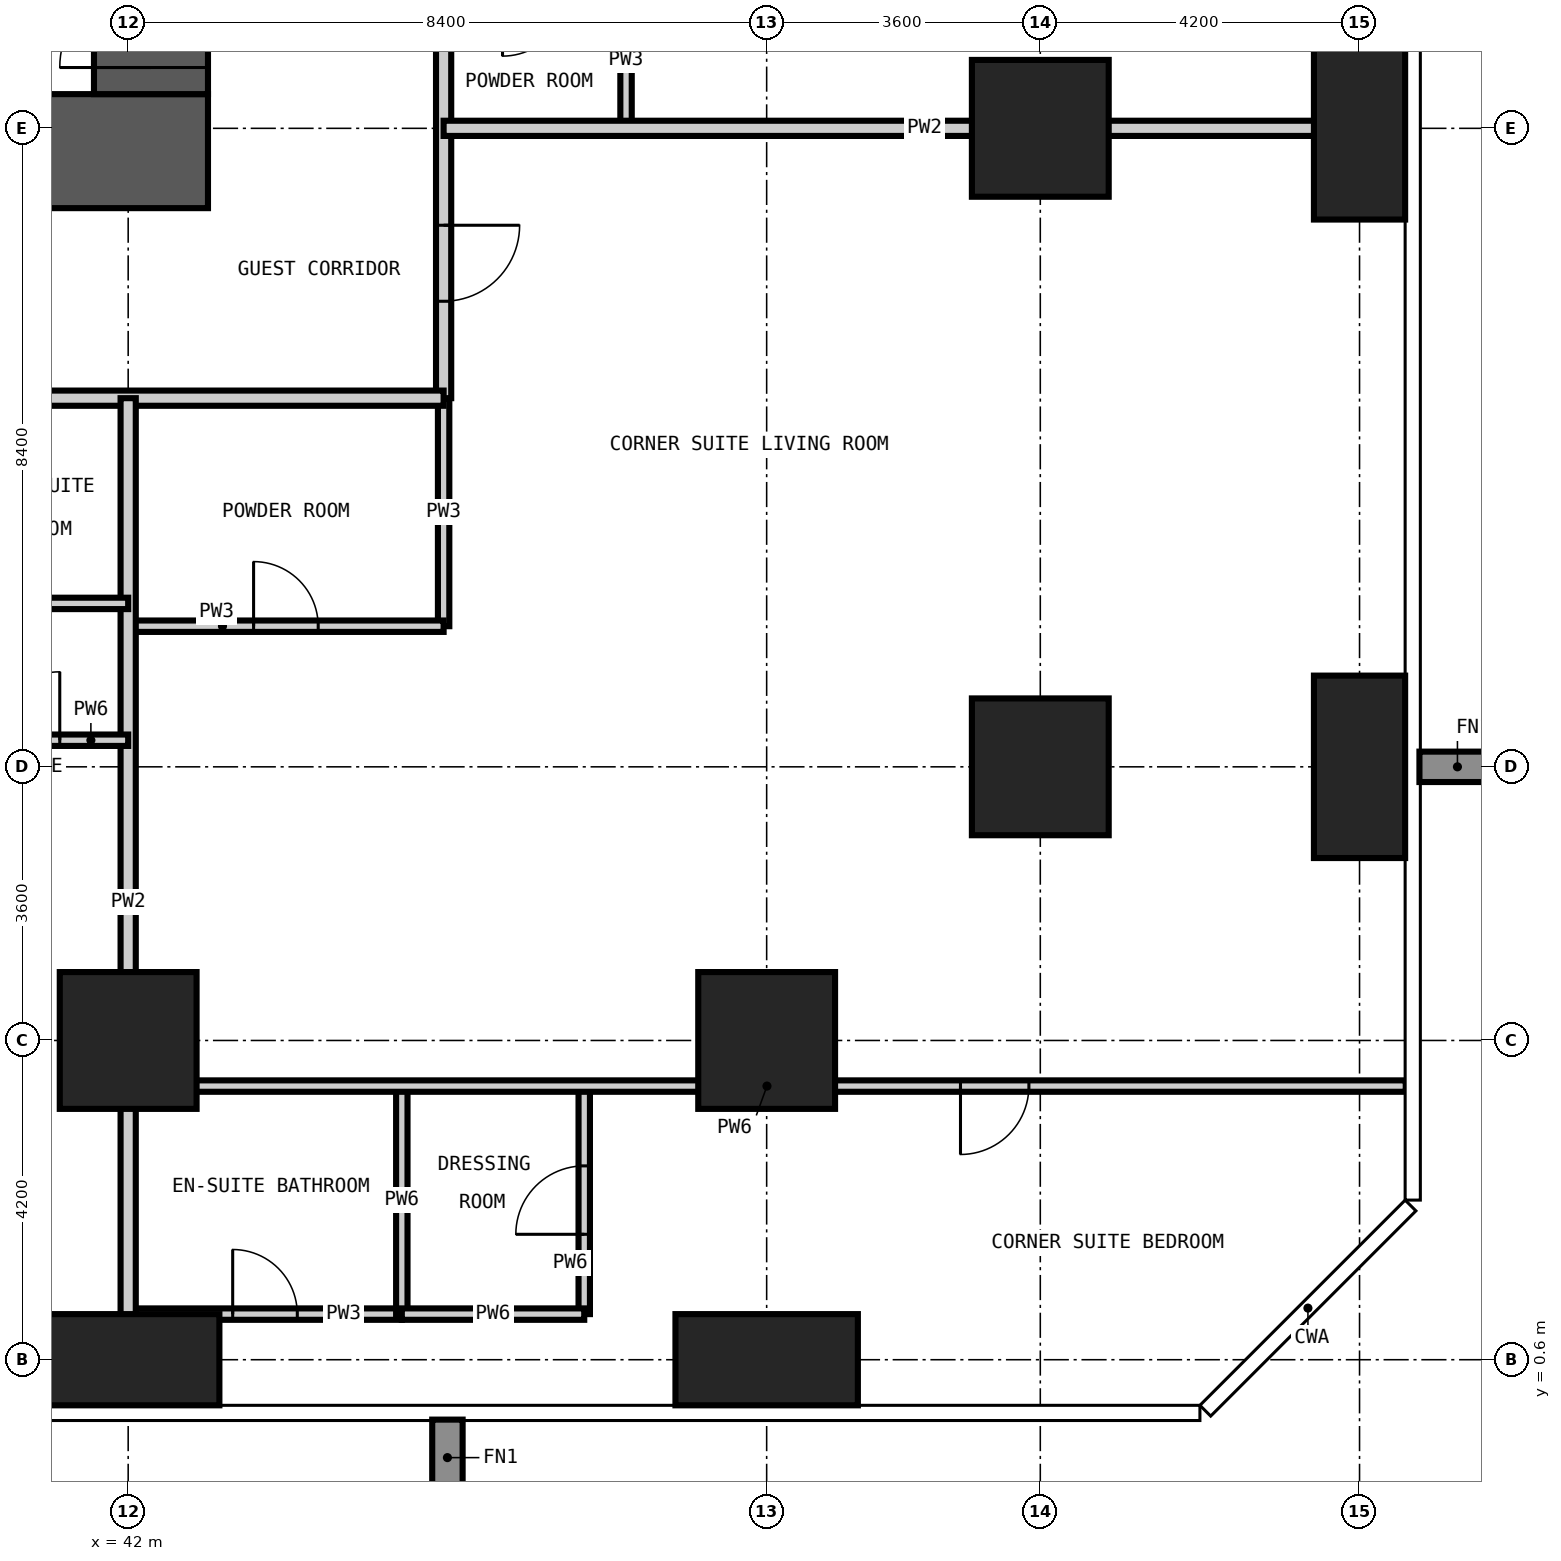
"""IFC4 building model, lengths in metres.
Left out: names, types, materials, properties, quantities, classifications, styles, units other than length and angle.
Written with IfcOpenShell. Run it as: python <this file> out.ifc"""

import sys

from ifc_helpers import new_model, si_unit, direction, frame, frame_2d, origin, origin_2d, place, context, subcontext, project, spatial, rectangle, extrude, element, fill, save


model = new_model("IFC4")
c1 = context("Model", 3, precision=1e-05, world=origin(), true_north=direction((0.0, 1.0)))
c2 = subcontext(c1, "Body", "Model", "MODEL_VIEW")
j1 = project(units=[si_unit("LENGTHUNIT", "METRE"), si_unit("PLANEANGLEUNIT", "RADIAN")], contexts=[c1])
p1 = place(None, origin())
s1 = spatial("IfcSite", under=j1, at=p1, CompositionType="ELEMENT")
p2 = place(p1, origin())
s2 = spatial("IfcBuilding", under=s1, at=p2, CompositionType="ELEMENT")
p3 = place(p2, frame((0.0, 0.0, 63.0)))
s3 = spatial("IfcBuildingStorey", under=s2, at=p3, CompositionType="ELEMENT", Elevation=63.0)
p4 = place(p3, frame((42.0, 0.6, -0.35), z_axis=(0.0, 0.0, 1.0), x_axis=(1.0, 0.0, 0.0)))
e1 = element("IfcColumn", 1, at=p4, inside=s3, PredefinedType="COLUMN", context=c2, shape_type="SweptSolid", body=[
    extrude(rectangle(XDim=2.4, YDim=1.2, at=origin_2d()), origin(), (0.0, 0.0, 1.0), 3.6),
])
p5 = place(p3, frame((42.0, 4.8, -0.35), z_axis=(0.0, 0.0, 1.0), x_axis=(1.0, 0.0, 0.0)))
e2 = element("IfcColumn", 2, at=p5, inside=s3, PredefinedType="COLUMN", context=c2, shape_type="SweptSolid", body=[
    extrude(rectangle(XDim=1.8, YDim=1.8, at=origin_2d()), origin(), (0.0, 0.0, 1.0), 3.6),
])
p6 = place(p3, frame((50.4, 0.6, -0.35), z_axis=(0.0, 0.0, 1.0), x_axis=(1.0, 0.0, 0.0)))
e3 = element("IfcColumn", 3, at=p6, inside=s3, PredefinedType="COLUMN", context=c2, shape_type="SweptSolid", body=[
    extrude(rectangle(XDim=2.4, YDim=1.2, at=origin_2d()), origin(), (0.0, 0.0, 1.0), 3.6),
])
for number, where, z_axis, x_axis in (
    (4, (50.4, 4.8, -0.35), (0.0, 0.0, 1.0), (1.0, 0.0, 0.0)),
    (5, (54.0, 8.4, -0.35), (0.0, 0.0, 1.0), (1.0, 0.0, 0.0)),
    (6, (54.0, 16.8, -0.35), (0.0, 0.0, 1.0), (1.0, 0.0, 0.0)),
):
    element("IfcColumn", number, at=place(p3, frame(where, z_axis=z_axis, x_axis=x_axis)), inside=s3, PredefinedType="COLUMN", context=c2, shape_type="SweptSolid", body=[
        extrude(rectangle(XDim=1.8, YDim=1.8, at=origin_2d()), origin(), (0.0, 0.0, 1.0), 3.6),
    ])
for number, where, z_axis, x_axis in (
    (7, (58.2, 8.4, -0.35), (0.0, 0.0, 1.0), (1.0, 0.0, 0.0)),
    (8, (58.2, 16.8, -0.35), (0.0, 0.0, 1.0), (1.0, 0.0, 0.0)),
):
    element("IfcColumn", number, at=place(p3, frame(where, z_axis=z_axis, x_axis=x_axis)), inside=s3, PredefinedType="COLUMN", context=c2, shape_type="SweptSolid", body=[
        extrude(rectangle(XDim=1.2, YDim=2.4, at=origin_2d()), origin(), (0.0, 0.0, 1.0), 3.6),
    ])
p7 = place(p3, frame((15.75, 16.5, -0.35), z_axis=(0.0, 0.0, 1.0), x_axis=(1.0, 0.0, 0.0)))
e9 = element("IfcWall", 9, at=p7, inside=s3, PredefinedType="SHEAR", context=c2, shape_type="SweptSolid", body=[
    extrude(rectangle(XDim=27.3, YDim=1.5, at=frame_2d((13.65, 0.0))), origin(), (0.0, 0.0, 1.0), 3.6),
])
p8 = place(p7, frame((13.15, 0.0, 0.35)))
e10 = element("IfcOpeningElement", 10, at=p8, cuts=e9, PredefinedType="OPENING", context=c2, shape_type="SweptSolid", body=[
    extrude(rectangle(XDim=1.0, YDim=2.1, at=frame_2d((0.5, 1.05))), frame((0.0, 0.76, 0.0), z_axis=(0.0, -1.0, 0.0), x_axis=(1.0, 0.0, 0.0)), (0.0, 0.0, 1.0), 1.52),
])
p9 = place(p7, frame((19.45, 0.0, 0.35)))
e11 = element("IfcOpeningElement", 11, at=p9, cuts=e9, PredefinedType="OPENING", context=c2, shape_type="SweptSolid", body=[
    extrude(rectangle(XDim=1.0, YDim=2.1, at=frame_2d((0.5, 1.05))), frame((0.0, 0.76, 0.0), z_axis=(0.0, -1.0, 0.0), x_axis=(1.0, 0.0, 0.0)), (0.0, 0.0, 1.0), 1.52),
])
p10 = place(p3, frame((42.3, 17.25, -0.35), z_axis=(0.0, 0.0, 1.0), x_axis=(0.0, 1.0, 0.0)))
e12 = element("IfcWall", 12, at=p10, inside=s3, PredefinedType="SHEAR", context=c2, shape_type="SweptSolid", body=[
    extrude(rectangle(XDim=24.3, YDim=1.5, at=frame_2d((12.15, 0.0))), origin(), (0.0, 0.0, 1.0), 3.6),
])
p11 = place(p10, frame((0.35, 0.0, 0.35)))
e13 = element("IfcOpeningElement", 13, at=p11, cuts=e12, PredefinedType="OPENING", context=c2, shape_type="SweptSolid", body=[
    extrude(rectangle(XDim=1.2, YDim=2.2, at=frame_2d((0.6, 1.1))), frame((0.0, 0.76, 0.0), z_axis=(0.0, -1.0, 0.0), x_axis=(1.0, 0.0, 0.0)), (0.0, 0.0, 1.0), 1.52),
])
p12 = place(p10, frame((11.65, 0.0, 0.35)))
e14 = element("IfcOpeningElement", 14, at=p12, cuts=e12, PredefinedType="OPENING", context=c2, shape_type="SweptSolid", body=[
    extrude(rectangle(XDim=1.0, YDim=2.1, at=frame_2d((0.5, 1.05))), frame((0.0, 0.76, 0.0), z_axis=(0.0, -1.0, 0.0), x_axis=(1.0, 0.0, 0.0)), (0.0, 0.0, 1.0), 1.52),
])
p13 = place(p10, frame((20.05, 0.0, 0.35)))
e15 = element("IfcOpeningElement", 15, at=p13, cuts=e12, PredefinedType="OPENING", context=c2, shape_type="SweptSolid", body=[
    extrude(rectangle(XDim=1.0, YDim=2.1, at=frame_2d((0.5, 1.05))), frame((0.0, 0.76, 0.0), z_axis=(0.0, -1.0, 0.0), x_axis=(1.0, 0.0, 0.0)), (0.0, 0.0, 1.0), 1.52),
])
p14 = place(p3, frame((46.15, 10.25, 0.0), z_axis=(0.0, 0.0, 1.0), x_axis=(0.0, 1.0, 0.0)))
e16 = element("IfcWall", 16, at=p14, inside=s3, PredefinedType="PARTITIONING", context=c2, shape_type="SweptSolid", body=[
    extrude(rectangle(XDim=3.0, YDim=0.15, at=frame_2d((1.5, 0.0))), origin(), (0.0, 0.0, 1.0), 3.25),
])
p15 = place(p3, frame((48.55, 16.8, 0.0), z_axis=(0.0, 0.0, 1.0), x_axis=(0.0, 1.0, 0.0)))
e17 = element("IfcWall", 17, at=p15, inside=s3, PredefinedType="PARTITIONING", context=c2, shape_type="SweptSolid", body=[
    extrude(rectangle(XDim=1.8, YDim=0.15, at=frame_2d((0.9, 0.0))), origin(), (0.0, 0.0, 1.0), 3.25),
])
p16 = place(p3, frame((42.0, 1.2, 0.0), z_axis=(0.0, 0.0, 1.0), x_axis=(1.0, 0.0, 0.0)))
e18 = element("IfcWall", 18, at=p16, inside=s3, PredefinedType="PARTITIONING", context=c2, shape_type="SweptSolid", body=[
    extrude(rectangle(XDim=3.6, YDim=0.15, at=frame_2d((1.8, 0.0))), origin(), (0.0, 0.0, 1.0), 3.25),
])
p17 = place(p16, frame((1.375, 0.0, 0.0)))
e19 = element("IfcOpeningElement", 19, at=p17, cuts=e18, PredefinedType="OPENING", context=c2, shape_type="SweptSolid", body=[
    extrude(rectangle(XDim=0.85, YDim=2.1, at=frame_2d((0.425, 1.05))), frame((0.0, 0.085, 0.0), z_axis=(0.0, -1.0, 0.0), x_axis=(1.0, 0.0, 0.0)), (0.0, 0.0, 1.0), 0.17),
])
p18 = place(p3, frame((42.0, 10.25, 0.0), z_axis=(0.0, 0.0, 1.0), x_axis=(1.0, 0.0, 0.0)))
e20 = element("IfcWall", 20, at=p18, inside=s3, PredefinedType="PARTITIONING", context=c2, shape_type="SweptSolid", body=[
    extrude(rectangle(XDim=4.15, YDim=0.15, at=frame_2d((2.075, 0.0))), origin(), (0.0, 0.0, 1.0), 3.25),
])
p19 = place(p18, frame((1.65, 0.0, 0.0)))
e21 = element("IfcOpeningElement", 21, at=p19, cuts=e20, PredefinedType="OPENING", context=c2, shape_type="SweptSolid", body=[
    extrude(rectangle(XDim=0.85, YDim=2.1, at=frame_2d((0.425, 1.05))), frame((0.0, 0.085, 0.0), z_axis=(0.0, -1.0, 0.0), x_axis=(1.0, 0.0, 0.0)), (0.0, 0.0, 1.0), 0.17),
])
p20 = place(p3, frame((46.15, 44.95, 0.0), z_axis=(0.0, 0.0, 1.0), x_axis=(0.0, -1.0, 0.0)))
e22 = element("IfcWall", 22, at=p20, inside=s3, PredefinedType="PARTITIONING", context=c2, shape_type="SweptSolid", body=[
    extrude(rectangle(XDim=31.7, YDim=0.2, at=frame_2d((15.85, 0.0))), origin(), (0.0, 0.0, 1.0), 3.25),
])
p21 = place(p20, frame((24.65, 0.0, 0.0)))
e23 = element("IfcOpeningElement", 23, at=p21, cuts=e22, PredefinedType="OPENING", context=c2, shape_type="SweptSolid", body=[
    extrude(rectangle(XDim=1.0, YDim=2.2, at=frame_2d((0.5, 1.1))), frame((0.0, 0.11, 0.0), z_axis=(0.0, -1.0, 0.0), x_axis=(1.0, 0.0, 0.0)), (0.0, 0.0, 1.0), 0.22),
])
p22 = place(p20, frame((13.85, 0.0, 0.0)))
e24 = element("IfcOpeningElement", 24, at=p22, cuts=e22, PredefinedType="OPENING", context=c2, shape_type="SweptSolid", body=[
    extrude(rectangle(XDim=1.0, YDim=2.2, at=frame_2d((0.5, 1.1))), frame((0.0, 0.11, 0.0), z_axis=(0.0, -1.0, 0.0), x_axis=(1.0, 0.0, 0.0)), (0.0, 0.0, 1.0), 0.22),
])
p23 = place(p20, frame((7.85, 0.0, 0.0)))
e25 = element("IfcOpeningElement", 25, at=p23, cuts=e22, PredefinedType="OPENING", context=c2, shape_type="SweptSolid", body=[
    extrude(rectangle(XDim=1.0, YDim=2.2, at=frame_2d((0.5, 1.1))), frame((0.0, 0.11, 0.0), z_axis=(0.0, -1.0, 0.0), x_axis=(1.0, 0.0, 0.0)), (0.0, 0.0, 1.0), 0.22),
])
p24 = place(p20, frame((29.425, 0.0, 0.0)))
e26 = element("IfcOpeningElement", 26, at=p24, cuts=e22, PredefinedType="OPENING", context=c2, shape_type="SweptSolid", body=[
    extrude(rectangle(XDim=1.0, YDim=2.2, at=frame_2d((0.5, 1.1))), frame((0.0, 0.11, 0.0), z_axis=(0.0, -1.0, 0.0), x_axis=(1.0, 0.0, 0.0)), (0.0, 0.0, 1.0), 0.22),
])
p25 = place(p20, frame((0.975, 0.0, 0.0)))
e27 = element("IfcOpeningElement", 27, at=p25, cuts=e22, PredefinedType="OPENING", context=c2, shape_type="SweptSolid", body=[
    extrude(rectangle(XDim=1.0, YDim=2.2, at=frame_2d((0.5, 1.1))), frame((0.0, 0.11, 0.0), z_axis=(0.0, -1.0, 0.0), x_axis=(1.0, 0.0, 0.0)), (0.0, 0.0, 1.0), 0.22),
])
p26 = place(p3, frame((46.15, 13.25, 0.0), z_axis=(0.0, 0.0, 1.0), x_axis=(-1.0, 0.0, 0.0)))
e28 = element("IfcWall", 28, at=p26, inside=s3, PredefinedType="PARTITIONING", context=c2, shape_type="SweptSolid", body=[
    extrude(rectangle(XDim=32.9, YDim=0.2, at=frame_2d((16.45, 0.0))), origin(), (0.0, 0.0, 1.0), 3.25),
])
p27 = place(p26, frame((25.4, 0.0, 0.0)))
e29 = element("IfcOpeningElement", 29, at=p27, cuts=e28, PredefinedType="OPENING", context=c2, shape_type="SweptSolid", body=[
    extrude(rectangle(XDim=1.0, YDim=2.2, at=frame_2d((0.5, 1.1))), frame((0.0, 0.11, 0.0), z_axis=(0.0, -1.0, 0.0), x_axis=(1.0, 0.0, 0.0)), (0.0, 0.0, 1.0), 0.22),
])
p28 = place(p26, frame((20.45, 0.0, 0.0)))
e30 = element("IfcOpeningElement", 30, at=p28, cuts=e28, PredefinedType="OPENING", context=c2, shape_type="SweptSolid", body=[
    extrude(rectangle(XDim=1.0, YDim=2.2, at=frame_2d((0.5, 1.1))), frame((0.0, 0.11, 0.0), z_axis=(0.0, -1.0, 0.0), x_axis=(1.0, 0.0, 0.0)), (0.0, 0.0, 1.0), 0.22),
])
p29 = place(p26, frame((12.05, 0.0, 0.0)))
e31 = element("IfcOpeningElement", 31, at=p29, cuts=e28, PredefinedType="OPENING", context=c2, shape_type="SweptSolid", body=[
    extrude(rectangle(XDim=1.0, YDim=2.2, at=frame_2d((0.5, 1.1))), frame((0.0, 0.11, 0.0), z_axis=(0.0, -1.0, 0.0), x_axis=(1.0, 0.0, 0.0)), (0.0, 0.0, 1.0), 0.22),
])
p30 = place(p26, frame((7.1, 0.0, 0.0)))
e32 = element("IfcOpeningElement", 32, at=p30, cuts=e28, PredefinedType="OPENING", context=c2, shape_type="SweptSolid", body=[
    extrude(rectangle(XDim=1.0, YDim=2.2, at=frame_2d((0.5, 1.1))), frame((0.0, 0.11, 0.0), z_axis=(0.0, -1.0, 0.0), x_axis=(1.0, 0.0, 0.0)), (0.0, 0.0, 1.0), 0.22),
])
p31 = place(p3, frame((42.0, -0.008, 0.0), z_axis=(0.0, 0.0, 1.0), x_axis=(0.0, 1.0, 0.0)))
e33 = element("IfcWall", 33, at=p31, inside=s3, PredefinedType="PARTITIONING", context=c2, shape_type="SweptSolid", body=[
    extrude(rectangle(XDim=13.258, YDim=0.2, at=frame_2d((6.629, 0.0))), origin(), (0.0, 0.0, 1.0), 3.25),
])
p32 = place(p3, frame((46.15, 16.8, 0.0), z_axis=(0.0, 0.0, 1.0), x_axis=(1.0, 0.0, 0.0)))
e34 = element("IfcWall", 34, at=p32, inside=s3, PredefinedType="PARTITIONING", context=c2, shape_type="SweptSolid", body=[
    extrude(rectangle(XDim=12.658, YDim=0.2, at=frame_2d((6.329, 0.0))), origin(), (0.0, 0.0, 1.0), 3.25),
])
p33 = place(p3, frame((45.6, 1.2, 0.0), z_axis=(0.0, 0.0, 1.0), x_axis=(0.0, 1.0, 0.0)))
e35 = element("IfcWall", 35, at=p33, inside=s3, PredefinedType="PARTITIONING", context=c2, shape_type="SweptSolid", body=[
    extrude(rectangle(XDim=3.0, YDim=0.15, at=frame_2d((1.5, 0.0))), origin(), (0.0, 0.0, 1.0), 3.25),
])
p34 = place(p3, frame((48.0, 1.2, 0.0), z_axis=(0.0, 0.0, 1.0), x_axis=(0.0, 1.0, 0.0)))
e36 = element("IfcWall", 36, at=p34, inside=s3, PredefinedType="PARTITIONING", context=c2, shape_type="SweptSolid", body=[
    extrude(rectangle(XDim=3.0, YDim=0.15, at=frame_2d((1.5, 0.0))), origin(), (0.0, 0.0, 1.0), 3.25),
])
p35 = place(p34, frame((1.05, 0.0, 0.0)))
e37 = element("IfcOpeningElement", 37, at=p35, cuts=e36, PredefinedType="OPENING", context=c2, shape_type="SweptSolid", body=[
    extrude(rectangle(XDim=0.9, YDim=2.1, at=frame_2d((0.45, 1.05))), frame((0.0, 0.085, 0.0), z_axis=(0.0, -1.0, 0.0), x_axis=(1.0, 0.0, 0.0)), (0.0, 0.0, 1.0), 0.17),
])
p36 = place(p3, frame((45.6, 1.2, 0.0), z_axis=(0.0, 0.0, 1.0), x_axis=(1.0, 0.0, 0.0)))
e38 = element("IfcWall", 38, at=p36, inside=s3, PredefinedType="PARTITIONING", context=c2, shape_type="SweptSolid", body=[
    extrude(rectangle(XDim=2.4, YDim=0.15, at=frame_2d((1.2, 0.0))), origin(), (0.0, 0.0, 1.0), 3.25),
])
p37 = place(p3, frame((42.0, 4.2, 0.0), z_axis=(0.0, 0.0, 1.0), x_axis=(1.0, 0.0, 0.0)))
e39 = element("IfcWall", 39, at=p37, inside=s3, PredefinedType="PARTITIONING", context=c2, shape_type="SweptSolid", body=[
    extrude(rectangle(XDim=16.808, YDim=0.15, at=frame_2d((8.404, 0.0))), origin(), (0.0, 0.0, 1.0), 3.25),
])
p38 = place(p37, frame((10.95, 0.0, 0.0)))
e40 = element("IfcOpeningElement", 40, at=p38, cuts=e39, PredefinedType="OPENING", context=c2, shape_type="SweptSolid", body=[
    extrude(rectangle(XDim=0.9, YDim=2.1, at=frame_2d((0.45, 1.05))), frame((0.0, 0.085, 0.0), z_axis=(0.0, -1.0, 0.0), x_axis=(1.0, 0.0, 0.0)), (0.0, 0.0, 1.0), 0.17),
])
p39 = place(p3, frame((39.3, 8.75, 0.0), z_axis=(0.0, 0.0, 1.0), x_axis=(1.0, 0.0, 0.0)))
e41 = element("IfcWall", 41, at=p39, inside=s3, PredefinedType="PARTITIONING", context=c2, shape_type="SweptSolid", body=[
    extrude(rectangle(XDim=2.7, YDim=0.15, at=frame_2d((1.35, 0.0))), origin(), (0.0, 0.0, 1.0), 3.25),
])
p40 = place(p39, frame((0.9, 0.0, 0.0)))
e42 = element("IfcOpeningElement", 42, at=p40, cuts=e41, PredefinedType="OPENING", context=c2, shape_type="SweptSolid", body=[
    extrude(rectangle(XDim=0.9, YDim=2.1, at=frame_2d((0.45, 1.05))), frame((0.0, 0.085, 0.0), z_axis=(0.0, -1.0, 0.0), x_axis=(1.0, 0.0, 0.0)), (0.0, 0.0, 1.0), 0.17),
])
p41 = place(p3, frame((39.3, 10.55, 0.0), z_axis=(0.0, 0.0, 1.0), x_axis=(1.0, 0.0, 0.0)))
e43 = element("IfcWall", 43, at=p41, inside=s3, PredefinedType="PARTITIONING", context=c2, shape_type="SweptSolid", body=[
    extrude(rectangle(XDim=2.7, YDim=0.15, at=frame_2d((1.35, 0.0))), origin(), (0.0, 0.0, 1.0), 3.25),
])
p42 = place(p11, origin())
e44 = element("IfcDoor", 44, at=p42, inside=s3, OperationType="SINGLE_SWING_LEFT", PredefinedType="DOOR", context=c2, shape_type="SweptSolid", body=[
    extrude(rectangle(XDim=1.2, YDim=2.2, at=frame_2d((0.6, 1.1))), frame((0.0, 0.025, 0.0), z_axis=(0.0, -1.0, 0.0), x_axis=(1.0, 0.0, 0.0)), (0.0, 0.0, 1.0), 0.05),
])
fill(e13, e44)
p43 = place(p40, origin())
e45 = element("IfcDoor", 45, at=p43, inside=s3, OperationType="SINGLE_SWING_RIGHT", PredefinedType="DOOR", context=c2, shape_type="SweptSolid", body=[
    extrude(rectangle(XDim=0.9, YDim=2.1, at=frame_2d((0.45, 1.05))), frame((0.0, 0.025, 0.0), z_axis=(0.0, -1.0, 0.0), x_axis=(1.0, 0.0, 0.0)), (0.0, 0.0, 1.0), 0.05),
])
fill(e42, e45)
p44 = place(p24, origin())
e46 = element("IfcDoor", 46, at=p44, inside=s3, OperationType="SINGLE_SWING_LEFT", PredefinedType="DOOR", context=c2, shape_type="SweptSolid", body=[
    extrude(rectangle(XDim=1.0, YDim=2.2, at=frame_2d((0.5, 1.1))), frame((0.0, 0.025, 0.0), z_axis=(0.0, -1.0, 0.0), x_axis=(1.0, 0.0, 0.0)), (0.0, 0.0, 1.0), 0.05),
])
fill(e26, e46)
p45 = place(p19, origin())
e47 = element("IfcDoor", 47, at=p45, inside=s3, OperationType="SINGLE_SWING_LEFT", PredefinedType="DOOR", context=c2, shape_type="SweptSolid", body=[
    extrude(rectangle(XDim=0.85, YDim=2.1, at=frame_2d((0.425, 1.05))), frame((0.0, 0.025, 0.0), z_axis=(0.0, -1.0, 0.0), x_axis=(1.0, 0.0, 0.0)), (0.0, 0.0, 1.0), 0.05),
])
fill(e21, e47)
p46 = place(p38, frame((0.9, 0.0, 0.0), z_axis=(0.0, 0.0, 1.0), x_axis=(-1.0, 0.0, 0.0)))
e48 = element("IfcDoor", 48, at=p46, inside=s3, OperationType="SINGLE_SWING_RIGHT", PredefinedType="DOOR", context=c2, shape_type="SweptSolid", body=[
    extrude(rectangle(XDim=0.9, YDim=2.1, at=frame_2d((0.45, 1.05))), frame((0.0, 0.025, 0.0), z_axis=(0.0, -1.0, 0.0), x_axis=(1.0, 0.0, 0.0)), (0.0, 0.0, 1.0), 0.05),
])
fill(e40, e48)
p47 = place(p17, origin())
e49 = element("IfcDoor", 49, at=p47, inside=s3, OperationType="SINGLE_SWING_LEFT", PredefinedType="DOOR", context=c2, shape_type="SweptSolid", body=[
    extrude(rectangle(XDim=0.85, YDim=2.1, at=frame_2d((0.425, 1.05))), frame((0.0, 0.025, 0.0), z_axis=(0.0, -1.0, 0.0), x_axis=(1.0, 0.0, 0.0)), (0.0, 0.0, 1.0), 0.05),
])
fill(e19, e49)
p48 = place(p35, origin())
e50 = element("IfcDoor", 50, at=p48, inside=s3, OperationType="SINGLE_SWING_LEFT", PredefinedType="DOOR", context=c2, shape_type="SweptSolid", body=[
    extrude(rectangle(XDim=0.9, YDim=2.1, at=frame_2d((0.45, 1.05))), frame((0.0, 0.025, 0.0), z_axis=(0.0, -1.0, 0.0), x_axis=(1.0, 0.0, 0.0)), (0.0, 0.0, 1.0), 0.05),
])
fill(e37, e50)
save(model, sys.argv[1])
